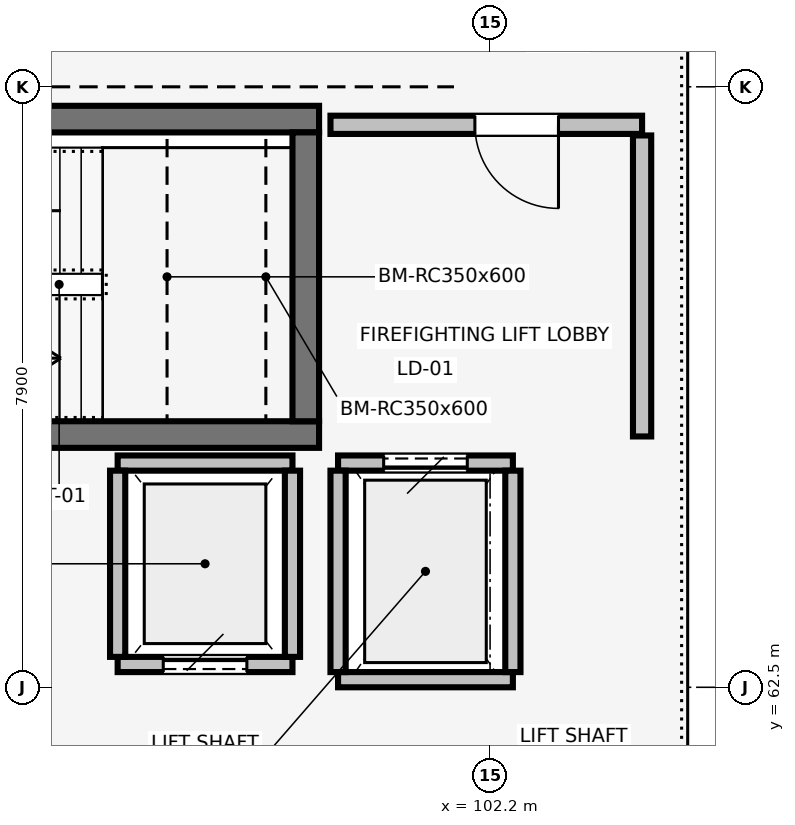
"""IFC4 building model, lengths in metres.
Left out: names, types, materials, properties, quantities, classifications, styles, units other than length and angle.
Written with IfcOpenShell. Run it as: python <this file> out.ifc"""

import sys

from ifc_helpers import new_model, si_unit, direction, frame, frame_2d, origin, place, context, subcontext, project, spatial, rectangle, extrude, element, fill, save


model = new_model("IFC4")
c1 = context("Model", 3, precision=1e-05, world=origin(), true_north=direction((0.0, 1.0)))
c2 = subcontext(c1, "Body", "Model", "MODEL_VIEW")
j1 = project(units=[si_unit("LENGTHUNIT", "METRE"), si_unit("PLANEANGLEUNIT", "RADIAN")], contexts=[c1])
p1 = place(None, origin())
s1 = spatial("IfcSite", under=j1, at=p1, CompositionType="ELEMENT")
p2 = place(p1, origin())
s2 = spatial("IfcBuilding", under=s1, at=p2, CompositionType="ELEMENT")
p3 = place(p2, frame((0.0, 0.0, 10.2)))
s3 = spatial("IfcBuildingStorey", under=s2, at=p3, CompositionType="ELEMENT", Elevation=10.2)
for number, where, z_axis, x_axis in (
    (1, (91.45, 65.825, 0.0), (0.0, 0.0, 1.0), (1.0, 0.0, 0.0)),
    (2, (99.95, 69.975, 0.0), (0.0, 0.0, 1.0), (-1.0, 0.0, 0.0)),
):
    element("IfcWall", number, at=place(p3, frame(where, z_axis=z_axis, x_axis=x_axis)), inside=s3, PredefinedType="SHEAR", context=c2, shape_type="SweptSolid", body=[
        extrude(rectangle(XDim=8.5, YDim=0.35, at=frame_2d((4.25, 0.0))), origin(), (0.0, 0.0, 1.0), 4.48),
    ])
p4 = place(p3, frame((99.775, 69.8, 0.0), z_axis=(0.0, 0.0, 1.0), x_axis=(0.0, -1.0, 0.0)))
e3 = element("IfcWall", 3, at=p4, inside=s3, PredefinedType="SHEAR", context=c2, shape_type="SweptSolid", body=[
    extrude(rectangle(XDim=3.8, YDim=0.35, at=frame_2d((1.9, 0.0))), origin(), (0.0, 0.0, 1.0), 4.48),
])
p5 = place(p3, frame((100.2, 62.6, 0.0), z_axis=(0.0, 0.0, 1.0), x_axis=(1.0, 0.0, 0.0)))
e4 = element("IfcWall", 4, at=p5, inside=s3, PredefinedType="PARTITIONING", context=c2, shape_type="SweptSolid", body=[
    extrude(rectangle(XDim=2.3, YDim=0.2, at=frame_2d((1.15, 0.0))), origin(), (0.0, 0.0, 1.0), 4.472),
])
p6 = place(p3, frame((102.5, 65.45, 0.0), z_axis=(0.0, 0.0, 1.0), x_axis=(-1.0, 0.0, 0.0)))
e5 = element("IfcWall", 5, at=p6, inside=s3, PredefinedType="PARTITIONING", context=c2, shape_type="SweptSolid", body=[
    extrude(rectangle(XDim=2.3, YDim=0.2, at=frame_2d((1.15, 0.0))), origin(), (0.0, 0.0, 1.0), 4.472),
])
p7 = place(p6, frame((0.6, 0.0, 0.0)))
e6 = element("IfcOpeningElement", 6, at=p7, cuts=e5, PredefinedType="OPENING", context=c2, shape_type="SweptSolid", body=[
    extrude(rectangle(XDim=1.1, YDim=2.15, at=frame_2d((0.55, 1.075))), frame((0.0, 0.11, 0.0), z_axis=(0.0, -1.0, 0.0), x_axis=(1.0, 0.0, 0.0)), (0.0, 0.0, 1.0), 0.22),
])
for number, where, z_axis, x_axis in (
    (7, (100.2, 62.7, 0.0), (0.0, 0.0, 1.0), (0.0, 1.0, 0.0)),
    (8, (102.5, 65.35, 0.0), (0.0, 0.0, 1.0), (0.0, -1.0, 0.0)),
):
    element("IfcWall", number, at=place(p3, frame(where, z_axis=z_axis, x_axis=x_axis)), inside=s3, PredefinedType="PARTITIONING", context=c2, shape_type="SweptSolid", body=[
        extrude(rectangle(XDim=2.65, YDim=0.2, at=frame_2d((1.325, 0.0))), origin(), (0.0, 0.0, 1.0), 4.472),
    ])
p8 = place(p3, frame((97.3, 62.8, 0.0), z_axis=(0.0, 0.0, 1.0), x_axis=(1.0, 0.0, 0.0)))
e9 = element("IfcWall", 9, at=p8, inside=s3, PredefinedType="PARTITIONING", context=c2, shape_type="SweptSolid", body=[
    extrude(rectangle(XDim=2.3, YDim=0.2, at=frame_2d((1.15, 0.0))), origin(), (0.0, 0.0, 1.0), 4.472),
])
p9 = place(p8, frame((0.6, 0.0, 0.0)))
e10 = element("IfcOpeningElement", 10, at=p9, cuts=e9, PredefinedType="OPENING", context=c2, shape_type="SweptSolid", body=[
    extrude(rectangle(XDim=1.1, YDim=2.15, at=frame_2d((0.55, 1.075))), frame((0.0, 0.11, 0.0), z_axis=(0.0, -1.0, 0.0), x_axis=(1.0, 0.0, 0.0)), (0.0, 0.0, 1.0), 0.22),
])
p10 = place(p3, frame((99.6, 65.45, 0.0), z_axis=(0.0, 0.0, 1.0), x_axis=(-1.0, 0.0, 0.0)))
e11 = element("IfcWall", 11, at=p10, inside=s3, PredefinedType="PARTITIONING", context=c2, shape_type="SweptSolid", body=[
    extrude(rectangle(XDim=2.3, YDim=0.2, at=frame_2d((1.15, 0.0))), origin(), (0.0, 0.0, 1.0), 4.472),
])
for number, where, z_axis, x_axis in (
    (12, (97.3, 62.9, 0.0), (0.0, 0.0, 1.0), (0.0, 1.0, 0.0)),
    (13, (99.6, 65.35, 0.0), (0.0, 0.0, 1.0), (0.0, -1.0, 0.0)),
):
    element("IfcWall", number, at=place(p3, frame(where, z_axis=z_axis, x_axis=x_axis)), inside=s3, PredefinedType="PARTITIONING", context=c2, shape_type="SweptSolid", body=[
        extrude(rectangle(XDim=2.45, YDim=0.2, at=frame_2d((1.225, 0.0))), origin(), (0.0, 0.0, 1.0), 4.472),
    ])
p11 = place(p3, frame((104.2, 69.9, 0.0), z_axis=(0.0, 0.0, 1.0), x_axis=(-1.0, 0.0, 0.0)))
e14 = element("IfcWall", 14, at=p11, inside=s3, PredefinedType="PARTITIONING", context=c2, shape_type="SweptSolid", body=[
    extrude(rectangle(XDim=4.1, YDim=0.24, at=frame_2d((2.05, 0.0))), origin(), (0.0, 0.0, 1.0), 4.472),
])
p12 = place(p11, frame((1.1, 0.0, 0.0)))
e15 = element("IfcOpeningElement", 15, at=p12, cuts=e14, PredefinedType="OPENING", context=c2, shape_type="SweptSolid", body=[
    extrude(rectangle(XDim=1.1, YDim=2.08, at=frame_2d((0.55, 1.04))), frame((0.0, 0.13, 0.0), z_axis=(0.0, -1.0, 0.0), x_axis=(1.0, 0.0, 0.0)), (0.0, 0.0, 1.0), 0.26),
])
p13 = place(p3, frame((104.2, 69.76, 0.0), z_axis=(0.0, 0.0, 1.0), x_axis=(0.0, -1.0, 0.0)))
e16 = element("IfcWall", 16, at=p13, inside=s3, PredefinedType="PARTITIONING", context=c2, shape_type="SweptSolid", body=[
    extrude(rectangle(XDim=3.96, YDim=0.24, at=frame_2d((1.98, 0.0))), origin(), (0.0, 0.0, 1.0), 4.472),
])
p14 = place(p7, origin())
e17 = element("IfcDoor", 17, at=p14, inside=s3, OperationType="SLIDING_TO_LEFT", PredefinedType="DOOR", context=c2, shape_type="SweptSolid", body=[
    extrude(rectangle(XDim=1.1, YDim=2.15, at=frame_2d((0.55, 1.075))), frame((0.0, 0.025, 0.0), z_axis=(0.0, -1.0, 0.0), x_axis=(1.0, 0.0, 0.0)), (0.0, 0.0, 1.0), 0.05),
])
fill(e6, e17)
p15 = place(p9, origin())
e18 = element("IfcDoor", 18, at=p15, inside=s3, OperationType="SLIDING_TO_LEFT", PredefinedType="DOOR", context=c2, shape_type="SweptSolid", body=[
    extrude(rectangle(XDim=1.1, YDim=2.15, at=frame_2d((0.55, 1.075))), frame((0.0, 0.025, 0.0), z_axis=(0.0, -1.0, 0.0), x_axis=(1.0, 0.0, 0.0)), (0.0, 0.0, 1.0), 0.05),
])
fill(e10, e18)
p16 = place(p12, origin())
e19 = element("IfcDoor", 19, at=p16, inside=s3, OperationType="SINGLE_SWING_LEFT", PredefinedType="DOOR", context=c2, shape_type="SweptSolid", body=[
    extrude(rectangle(XDim=1.1, YDim=2.08, at=frame_2d((0.55, 1.04))), frame((0.0, 0.025, 0.0), z_axis=(0.0, -1.0, 0.0), x_axis=(1.0, 0.0, 0.0)), (0.0, 0.0, 1.0), 0.05),
])
fill(e15, e19)
save(model, sys.argv[1])
